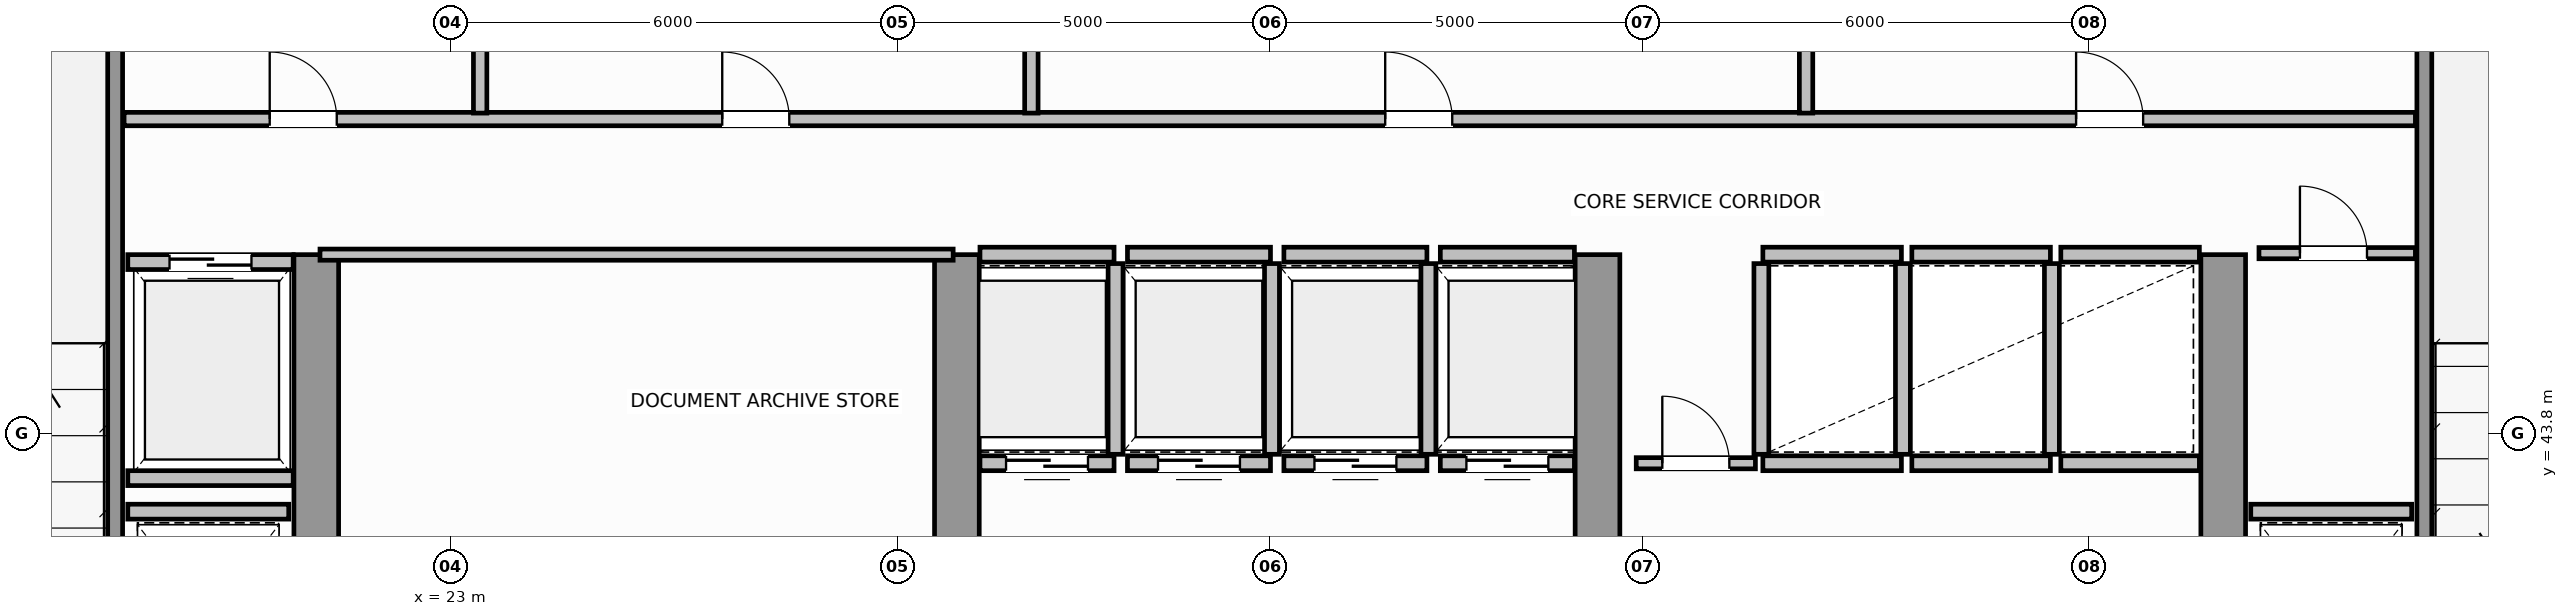
"""IFC4 building model, lengths in metres.
Left out: names, types, materials, properties, quantities, classifications, styles, units other than length and angle.
Written with IfcOpenShell. Run it as: python <this file> out.ifc"""

import sys

from ifc_helpers import new_model, si_unit, direction, frame, frame_2d, origin, place, context, subcontext, project, spatial, rectangle, extrude, source, transform, mapped, element, fill, save


model = new_model("IFC4")
c1 = context("Model", 3, precision=1e-05, world=origin(), true_north=direction((0.0, 1.0)))
c2 = subcontext(c1, "Body", "Model", "MODEL_VIEW")
j1 = project(units=[si_unit("LENGTHUNIT", "METRE"), si_unit("PLANEANGLEUNIT", "RADIAN")], contexts=[c1])
p1 = place(None, origin())
s1 = spatial("IfcSite", under=j1, at=p1, CompositionType="ELEMENT")
p2 = place(p1, origin())
s2 = spatial("IfcBuilding", under=s1, at=p2, CompositionType="ELEMENT")
p3 = place(p2, frame((0.0, 0.0, 191.8)))
s3 = spatial("IfcBuildingStorey", under=s2, at=p3, CompositionType="ELEMENT", Elevation=191.8)
for number, where, z_axis, x_axis in (
    (1, (21.2, 36.82, 0.0), (0.0, 0.0, 1.0), (0.0, 1.0, 0.0)),
    (2, (29.8, 36.82, 0.0), (0.0, 0.0, 1.0), (0.0, 1.0, 0.0)),
    (3, (38.4, 36.82, 0.0), (0.0, 0.0, 1.0), (0.0, 1.0, 0.0)),
    (4, (46.8, 36.82, 0.0), (0.0, 0.0, 1.0), (0.0, 1.0, 0.0)),
):
    element("IfcWall", number, at=place(p3, frame(where, z_axis=z_axis, x_axis=x_axis)), inside=s3, PredefinedType="SHEAR", context=c2, shape_type="SweptSolid", body=[
        extrude(rectangle(XDim=9.38, YDim=0.6, at=frame_2d((4.69, 0.0))), origin(), (0.0, 0.0, 1.0), 3.8),
    ])
for number, where, z_axis, x_axis in (
    (5, (18.5, 39.96, 0.0), (0.0, 0.0, 1.0), (0.0, 1.0, 0.0)),
    (6, (49.5, 39.96, 0.0), (0.0, 0.0, 1.0), (0.0, 1.0, 0.0)),
):
    element("IfcWall", number, at=place(p3, frame(where, z_axis=z_axis, x_axis=x_axis)), inside=s3, PredefinedType="SOLIDWALL", context=c2, shape_type="SweptSolid", body=[
        extrude(rectangle(XDim=9.93, YDim=0.2, at=frame_2d((4.965, 0.0))), origin(), (0.0, 0.0, 1.0), 3.8),
    ])
p4 = place(p3, frame((30.11, 43.4, 0.0), z_axis=(0.0, 0.0, 1.0), x_axis=(1.0, 0.0, 0.0)))
e7 = element("IfcWall", 7, at=p4, inside=s3, PredefinedType="SOLIDWALL", context=c2, shape_type="SweptSolid", body=[
    extrude(rectangle(XDim=1.8, YDim=0.2, at=frame_2d((0.9, 0.0))), origin(), (0.0, 0.0, 1.0), 3.58),
])
p5 = place(p4, frame((0.35, 0.0, 0.0)))
e8 = element("IfcOpeningElement", 8, at=p5, cuts=e7, PredefinedType="OPENING", context=c2, shape_type="SweptSolid", body=[
    extrude(rectangle(XDim=1.1, YDim=2.15, at=frame_2d((0.55, 1.075))), frame((0.0, 0.11, 0.0), z_axis=(0.0, -1.0, 0.0), x_axis=(1.0, 0.0, 0.0)), (0.0, 0.0, 1.0), 0.22),
])
p6 = place(p3, frame((30.11, 46.2, 0.0), z_axis=(0.0, 0.0, 1.0), x_axis=(1.0, 0.0, 0.0)))
e9 = element("IfcWall", 9, at=p6, inside=s3, PredefinedType="SOLIDWALL", context=c2, shape_type="SweptSolid", body=[
    extrude(rectangle(XDim=1.8, YDim=0.2, at=frame_2d((0.9, 0.0))), origin(), (0.0, 0.0, 1.0), 3.58),
])
p7 = place(p3, frame((31.93, 43.52, 0.0), z_axis=(0.0, 0.0, 1.0), x_axis=(0.0, 1.0, 0.0)))
e10 = element("IfcWall", 10, at=p7, inside=s3, PredefinedType="SOLIDWALL", context=c2, shape_type="SweptSolid", body=[
    extrude(rectangle(XDim=2.56, YDim=0.2, at=frame_2d((1.28, 0.0))), origin(), (0.0, 0.0, 1.0), 3.58),
])
p8 = place(p3, frame((32.09, 43.4, 0.0), z_axis=(0.0, 0.0, 1.0), x_axis=(1.0, 0.0, 0.0)))
e11 = element("IfcWall", 11, at=p8, inside=s3, PredefinedType="SOLIDWALL", context=c2, shape_type="SweptSolid", body=[
    extrude(rectangle(XDim=1.92, YDim=0.2, at=frame_2d((0.96, 0.0))), origin(), (0.0, 0.0, 1.0), 3.58),
])
p9 = place(p8, frame((0.41, 0.0, 0.0)))
e12 = element("IfcOpeningElement", 12, at=p9, cuts=e11, PredefinedType="OPENING", context=c2, shape_type="SweptSolid", body=[
    extrude(rectangle(XDim=1.1, YDim=2.15, at=frame_2d((0.55, 1.075))), frame((0.0, 0.11, 0.0), z_axis=(0.0, -1.0, 0.0), x_axis=(1.0, 0.0, 0.0)), (0.0, 0.0, 1.0), 0.22),
])
p10 = place(p3, frame((32.09, 46.2, 0.0), z_axis=(0.0, 0.0, 1.0), x_axis=(1.0, 0.0, 0.0)))
e13 = element("IfcWall", 13, at=p10, inside=s3, PredefinedType="SOLIDWALL", context=c2, shape_type="SweptSolid", body=[
    extrude(rectangle(XDim=1.92, YDim=0.2, at=frame_2d((0.96, 0.0))), origin(), (0.0, 0.0, 1.0), 3.58),
])
p11 = place(p3, frame((34.03, 43.52, 0.0), z_axis=(0.0, 0.0, 1.0), x_axis=(0.0, 1.0, 0.0)))
e14 = element("IfcWall", 14, at=p11, inside=s3, PredefinedType="SOLIDWALL", context=c2, shape_type="SweptSolid", body=[
    extrude(rectangle(XDim=2.56, YDim=0.2, at=frame_2d((1.28, 0.0))), origin(), (0.0, 0.0, 1.0), 3.58),
])
p12 = place(p3, frame((34.19, 43.4, 0.0), z_axis=(0.0, 0.0, 1.0), x_axis=(1.0, 0.0, 0.0)))
e15 = element("IfcWall", 15, at=p12, inside=s3, PredefinedType="SOLIDWALL", context=c2, shape_type="SweptSolid", body=[
    extrude(rectangle(XDim=1.92, YDim=0.2, at=frame_2d((0.96, 0.0))), origin(), (0.0, 0.0, 1.0), 3.58),
])
p13 = place(p12, frame((0.41, 0.0, 0.0)))
e16 = element("IfcOpeningElement", 16, at=p13, cuts=e15, PredefinedType="OPENING", context=c2, shape_type="SweptSolid", body=[
    extrude(rectangle(XDim=1.1, YDim=2.15, at=frame_2d((0.55, 1.075))), frame((0.0, 0.11, 0.0), z_axis=(0.0, -1.0, 0.0), x_axis=(1.0, 0.0, 0.0)), (0.0, 0.0, 1.0), 0.22),
])
p14 = place(p3, frame((34.19, 46.2, 0.0), z_axis=(0.0, 0.0, 1.0), x_axis=(1.0, 0.0, 0.0)))
e17 = element("IfcWall", 17, at=p14, inside=s3, PredefinedType="SOLIDWALL", context=c2, shape_type="SweptSolid", body=[
    extrude(rectangle(XDim=1.92, YDim=0.2, at=frame_2d((0.96, 0.0))), origin(), (0.0, 0.0, 1.0), 3.58),
])
p15 = place(p3, frame((36.13, 43.52, 0.0), z_axis=(0.0, 0.0, 1.0), x_axis=(0.0, 1.0, 0.0)))
e18 = element("IfcWall", 18, at=p15, inside=s3, PredefinedType="SOLIDWALL", context=c2, shape_type="SweptSolid", body=[
    extrude(rectangle(XDim=2.56, YDim=0.2, at=frame_2d((1.28, 0.0))), origin(), (0.0, 0.0, 1.0), 3.58),
])
p16 = place(p3, frame((36.29, 43.4, 0.0), z_axis=(0.0, 0.0, 1.0), x_axis=(1.0, 0.0, 0.0)))
e19 = element("IfcWall", 19, at=p16, inside=s3, PredefinedType="SOLIDWALL", context=c2, shape_type="SweptSolid", body=[
    extrude(rectangle(XDim=1.8, YDim=0.2, at=frame_2d((0.9, 0.0))), origin(), (0.0, 0.0, 1.0), 3.58),
])
p17 = place(p16, frame((0.35, 0.0, 0.0)))
e20 = element("IfcOpeningElement", 20, at=p17, cuts=e19, PredefinedType="OPENING", context=c2, shape_type="SweptSolid", body=[
    extrude(rectangle(XDim=1.1, YDim=2.15, at=frame_2d((0.55, 1.075))), frame((0.0, 0.11, 0.0), z_axis=(0.0, -1.0, 0.0), x_axis=(1.0, 0.0, 0.0)), (0.0, 0.0, 1.0), 0.22),
])
p18 = place(p3, frame((36.29, 46.2, 0.0), z_axis=(0.0, 0.0, 1.0), x_axis=(1.0, 0.0, 0.0)))
e21 = element("IfcWall", 21, at=p18, inside=s3, PredefinedType="SOLIDWALL", context=c2, shape_type="SweptSolid", body=[
    extrude(rectangle(XDim=1.8, YDim=0.2, at=frame_2d((0.9, 0.0))), origin(), (0.0, 0.0, 1.0), 3.58),
])
for number, where, z_axis, x_axis in (
    (22, (40.62, 43.4, 0.0), (0.0, 0.0, 1.0), (1.0, 0.0, 0.0)),
    (23, (40.62, 46.2, 0.0), (0.0, 0.0, 1.0), (1.0, 0.0, 0.0)),
):
    element("IfcWall", number, at=place(p3, frame(where, z_axis=z_axis, x_axis=x_axis)), inside=s3, PredefinedType="SOLIDWALL", context=c2, shape_type="SweptSolid", body=[
        extrude(rectangle(XDim=1.86, YDim=0.2, at=frame_2d((0.93, 0.0))), origin(), (0.0, 0.0, 1.0), 3.58),
    ])
for number, where, z_axis, x_axis in (
    (24, (40.6, 43.52, 0.0), (0.0, 0.0, 1.0), (0.0, 1.0, 0.0)),
    (25, (42.5, 43.52, 0.0), (0.0, 0.0, 1.0), (0.0, 1.0, 0.0)),
):
    element("IfcWall", number, at=place(p3, frame(where, z_axis=z_axis, x_axis=x_axis)), inside=s3, PredefinedType="SOLIDWALL", context=c2, shape_type="SweptSolid", body=[
        extrude(rectangle(XDim=2.56, YDim=0.2, at=frame_2d((1.28, 0.0))), origin(), (0.0, 0.0, 1.0), 3.58),
    ])
for number, where, z_axis, x_axis in (
    (26, (42.62, 43.4, 0.0), (0.0, 0.0, 1.0), (1.0, 0.0, 0.0)),
    (27, (42.62, 46.2, 0.0), (0.0, 0.0, 1.0), (1.0, 0.0, 0.0)),
):
    element("IfcWall", number, at=place(p3, frame(where, z_axis=z_axis, x_axis=x_axis)), inside=s3, PredefinedType="SOLIDWALL", context=c2, shape_type="SweptSolid", body=[
        extrude(rectangle(XDim=1.86, YDim=0.2, at=frame_2d((0.93, 0.0))), origin(), (0.0, 0.0, 1.0), 3.58),
    ])
p19 = place(p3, frame((44.5, 43.52, 0.0), z_axis=(0.0, 0.0, 1.0), x_axis=(0.0, 1.0, 0.0)))
e28 = element("IfcWall", 28, at=p19, inside=s3, PredefinedType="SOLIDWALL", context=c2, shape_type="SweptSolid", body=[
    extrude(rectangle(XDim=2.56, YDim=0.2, at=frame_2d((1.28, 0.0))), origin(), (0.0, 0.0, 1.0), 3.58),
])
for number, where, z_axis, x_axis in (
    (29, (44.62, 43.4, 0.0), (0.0, 0.0, 1.0), (1.0, 0.0, 0.0)),
    (30, (44.62, 46.2, 0.0), (0.0, 0.0, 1.0), (1.0, 0.0, 0.0)),
):
    element("IfcWall", number, at=place(p3, frame(where, z_axis=z_axis, x_axis=x_axis)), inside=s3, PredefinedType="SOLIDWALL", context=c2, shape_type="SweptSolid", body=[
        extrude(rectangle(XDim=1.86, YDim=0.2, at=frame_2d((0.93, 0.0))), origin(), (0.0, 0.0, 1.0), 3.58),
    ])
p20 = place(p3, frame((18.67, 46.1, 0.0), z_axis=(0.0, 0.0, 1.0), x_axis=(1.0, 0.0, 0.0)))
e31 = element("IfcWall", 31, at=p20, inside=s3, PredefinedType="SOLIDWALL", context=c2, shape_type="SweptSolid", body=[
    extrude(rectangle(XDim=2.22, YDim=0.2, at=frame_2d((1.11, 0.0))), origin(), (0.0, 0.0, 1.0), 3.58),
])
p21 = place(p20, frame((0.56, 0.0, 0.0)))
e32 = element("IfcOpeningElement", 32, at=p21, cuts=e31, PredefinedType="OPENING", context=c2, shape_type="SweptSolid", body=[
    extrude(rectangle(XDim=1.1, YDim=2.15, at=frame_2d((0.55, 1.075))), frame((0.0, 0.11, 0.0), z_axis=(0.0, -1.0, 0.0), x_axis=(1.0, 0.0, 0.0)), (0.0, 0.0, 1.0), 0.22),
])
p22 = place(p3, frame((18.67, 43.2, 0.0), z_axis=(0.0, 0.0, 1.0), x_axis=(1.0, 0.0, 0.0)))
e33 = element("IfcWall", 33, at=p22, inside=s3, PredefinedType="SOLIDWALL", context=c2, shape_type="SweptSolid", body=[
    extrude(rectangle(XDim=2.22, YDim=0.2, at=frame_2d((1.11, 0.0))), origin(), (0.0, 0.0, 1.0), 3.58),
])
for number, where, z_axis, x_axis in (
    (34, (18.67, 42.75, 0.0), (0.0, 0.0, 1.0), (1.0, 0.0, 0.0)),
    (35, (47.17, 42.75, 0.0), (0.0, 0.0, 1.0), (1.0, 0.0, 0.0)),
):
    element("IfcWall", number, at=place(p3, frame(where, z_axis=z_axis, x_axis=x_axis)), inside=s3, PredefinedType="SOLIDWALL", context=c2, shape_type="SweptSolid", body=[
        extrude(rectangle(XDim=2.16, YDim=0.2, at=frame_2d((1.08, 0.0))), origin(), (0.0, 0.0, 1.0), 3.58),
    ])
p23 = place(p3, frame((21.25, 46.2, 0.0), z_axis=(0.0, 0.0, 1.0), x_axis=(1.0, 0.0, 0.0)))
e36 = element("IfcWall", 36, at=p23, inside=s3, PredefinedType="PARTITIONING", context=c2, shape_type="SweptSolid", body=[
    extrude(rectangle(XDim=8.5, YDim=0.15, at=frame_2d((4.25, 0.0))), origin(), (0.0, 0.0, 1.0), 3.58),
])
p24 = place(p3, frame((47.28, 46.22, 0.0), z_axis=(0.0, 0.0, 1.0), x_axis=(1.0, 0.0, 0.0)))
e37 = element("IfcWall", 37, at=p24, inside=s3, PredefinedType="PARTITIONING", context=c2, shape_type="SweptSolid", body=[
    extrude(rectangle(XDim=2.1, YDim=0.15, at=frame_2d((1.05, 0.0))), origin(), (0.0, 0.0, 1.0), 3.58),
])
p25 = place(p24, frame((0.55, 0.0, 0.0)))
e38 = element("IfcOpeningElement", 38, at=p25, cuts=e37, PredefinedType="OPENING", context=c2, shape_type="SweptSolid", body=[
    extrude(rectangle(XDim=0.9, YDim=2.1, at=frame_2d((0.45, 1.05))), frame((0.0, 0.085, 0.0), z_axis=(0.0, -1.0, 0.0), x_axis=(1.0, 0.0, 0.0)), (0.0, 0.0, 1.0), 0.17),
])
p26 = place(p3, frame((38.92, 43.4, 0.0), z_axis=(0.0, 0.0, 1.0), x_axis=(1.0, 0.0, 0.0)))
e39 = element("IfcWall", 39, at=p26, inside=s3, PredefinedType="PARTITIONING", context=c2, shape_type="SweptSolid", body=[
    extrude(rectangle(XDim=1.6, YDim=0.15, at=frame_2d((0.8, 0.0))), origin(), (0.0, 0.0, 1.0), 3.58),
])
p27 = place(p26, frame((0.35, 0.0, 0.0)))
e40 = element("IfcOpeningElement", 40, at=p27, cuts=e39, PredefinedType="OPENING", context=c2, shape_type="SweptSolid", body=[
    extrude(rectangle(XDim=0.9, YDim=2.1, at=frame_2d((0.45, 1.05))), frame((0.0, 0.085, 0.0), z_axis=(0.0, -1.0, 0.0), x_axis=(1.0, 0.0, 0.0)), (0.0, 0.0, 1.0), 0.17),
])
p28 = place(p3, frame((18.62, 48.02, 0.0), z_axis=(0.0, 0.0, 1.0), x_axis=(1.0, 0.0, 0.0)))
e41 = element("IfcWall", 41, at=p28, inside=s3, PredefinedType="PLUMBINGWALL", context=c2, shape_type="SweptSolid", body=[
    extrude(rectangle(XDim=30.76, YDim=0.18, at=frame_2d((15.38, 0.0))), origin(), (0.0, 0.0, 1.0), 3.58),
])
p29 = place(p28, frame((1.955, 0.0, 0.0)))
e42 = element("IfcOpeningElement", 42, at=p29, cuts=e41, PredefinedType="OPENING", context=c2, shape_type="SweptSolid", body=[
    extrude(rectangle(XDim=0.9, YDim=2.15, at=frame_2d((0.45, 1.075))), frame((0.0, 0.1, 0.0), z_axis=(0.0, -1.0, 0.0), x_axis=(1.0, 0.0, 0.0)), (0.0, 0.0, 1.0), 0.2),
])
p30 = place(p28, frame((8.03, 0.0, 0.0)))
e43 = element("IfcOpeningElement", 43, at=p30, cuts=e41, PredefinedType="OPENING", context=c2, shape_type="SweptSolid", body=[
    extrude(rectangle(XDim=0.9, YDim=2.15, at=frame_2d((0.45, 1.075))), frame((0.0, 0.1, 0.0), z_axis=(0.0, -1.0, 0.0), x_axis=(1.0, 0.0, 0.0)), (0.0, 0.0, 1.0), 0.2),
])
p31 = place(p28, frame((16.93, 0.0, 0.0)))
e44 = element("IfcOpeningElement", 44, at=p31, cuts=e41, PredefinedType="OPENING", context=c2, shape_type="SweptSolid", body=[
    extrude(rectangle(XDim=0.9, YDim=2.15, at=frame_2d((0.45, 1.075))), frame((0.0, 0.1, 0.0), z_axis=(0.0, -1.0, 0.0), x_axis=(1.0, 0.0, 0.0)), (0.0, 0.0, 1.0), 0.2),
])
p32 = place(p28, frame((26.205, 0.0, 0.0)))
e45 = element("IfcOpeningElement", 45, at=p32, cuts=e41, PredefinedType="OPENING", context=c2, shape_type="SweptSolid", body=[
    extrude(rectangle(XDim=0.9, YDim=2.15, at=frame_2d((0.45, 1.075))), frame((0.0, 0.1, 0.0), z_axis=(0.0, -1.0, 0.0), x_axis=(1.0, 0.0, 0.0)), (0.0, 0.0, 1.0), 0.2),
])
for number, where, z_axis, x_axis in (
    (46, (23.4, 48.1, 0.0), (0.0, 0.0, 1.0), (0.0, 1.0, 0.0)),
    (47, (30.8, 48.1, 0.0), (0.0, 0.0, 1.0), (0.0, 1.0, 0.0)),
    (48, (41.2, 48.1, 0.0), (0.0, 0.0, 1.0), (0.0, 1.0, 0.0)),
):
    element("IfcWall", number, at=place(p3, frame(where, z_axis=z_axis, x_axis=x_axis)), inside=s3, PredefinedType="PLUMBINGWALL", context=c2, shape_type="SweptSolid", body=[
        extrude(rectangle(XDim=2.28, YDim=0.18, at=frame_2d((1.14, 0.0))), origin(), (0.0, 0.0, 1.0), 3.58),
    ])
m1 = source(origin(), c2, "Body", "SweptSolid", [
    extrude(rectangle(XDim=1.1, YDim=2.15, at=frame_2d((0.55, 1.075))), frame((0.0, 0.025, 0.0), z_axis=(0.0, -1.0, 0.0), x_axis=(1.0, 0.0, 0.0)), (0.0, 0.0, 1.0), 0.05),
])
p33 = place(p5, origin())
e49 = element("IfcDoor", 49, at=p33, inside=s3, OperationType="DOUBLE_DOOR_SLIDING", PredefinedType="DOOR", context=c2, shape_type="MappedRepresentation", body=[
    mapped(m1, transform((0.0, 0.0, 0.0), scale=1.0)),
])
fill(e8, e49)
p34 = place(p9, origin())
e50 = element("IfcDoor", 50, at=p34, inside=s3, OperationType="DOUBLE_DOOR_SLIDING", PredefinedType="DOOR", context=c2, shape_type="MappedRepresentation", body=[
    mapped(m1, transform((0.0, 0.0, 0.0), scale=1.0)),
])
fill(e12, e50)
p35 = place(p13, origin())
e51 = element("IfcDoor", 51, at=p35, inside=s3, OperationType="DOUBLE_DOOR_SLIDING", PredefinedType="DOOR", context=c2, shape_type="MappedRepresentation", body=[
    mapped(m1, transform((0.0, 0.0, 0.0), scale=1.0)),
])
fill(e16, e51)
p36 = place(p17, origin())
e52 = element("IfcDoor", 52, at=p36, inside=s3, OperationType="DOUBLE_DOOR_SLIDING", PredefinedType="DOOR", context=c2, shape_type="MappedRepresentation", body=[
    mapped(m1, transform((0.0, 0.0, 0.0), scale=1.0)),
])
fill(e20, e52)
p37 = place(p21, origin())
e53 = element("IfcDoor", 53, at=p37, inside=s3, OperationType="DOUBLE_DOOR_SLIDING", PredefinedType="DOOR", context=c2, shape_type="MappedRepresentation", body=[
    mapped(m1, transform((0.0, 0.0, 0.0), scale=1.0)),
])
fill(e32, e53)
m2 = source(origin(), c2, "Body", "SweptSolid", [
    extrude(rectangle(XDim=0.9, YDim=2.1, at=frame_2d((0.45, 1.05))), frame((0.0, 0.025, 0.0), z_axis=(0.0, -1.0, 0.0), x_axis=(1.0, 0.0, 0.0)), (0.0, 0.0, 1.0), 0.05),
])
p38 = place(p25, origin())
e54 = element("IfcDoor", 54, at=p38, inside=s3, OperationType="SINGLE_SWING_RIGHT", PredefinedType="DOOR", context=c2, shape_type="MappedRepresentation", body=[
    mapped(m2, transform((0.0, 0.0, 0.0), scale=1.0)),
])
fill(e38, e54)
p39 = place(p27, origin())
e55 = element("IfcDoor", 55, at=p39, inside=s3, OperationType="SINGLE_SWING_LEFT", PredefinedType="DOOR", context=c2, shape_type="MappedRepresentation", body=[
    mapped(m2, transform((0.0, 0.0, 0.0), scale=1.0)),
])
fill(e40, e55)
m3 = source(origin(), c2, "Body", "SweptSolid", [
    extrude(rectangle(XDim=0.9, YDim=2.15, at=frame_2d((0.45, 1.075))), frame((0.0, 0.025, 0.0), z_axis=(0.0, -1.0, 0.0), x_axis=(1.0, 0.0, 0.0)), (0.0, 0.0, 1.0), 0.05),
])
p40 = place(p29, origin())
e56 = element("IfcDoor", 56, at=p40, inside=s3, OperationType="SINGLE_SWING_LEFT", PredefinedType="DOOR", context=c2, shape_type="MappedRepresentation", body=[
    mapped(m3, transform((0.0, 0.0, 0.0), scale=1.0)),
])
fill(e42, e56)
p41 = place(p30, origin())
e57 = element("IfcDoor", 57, at=p41, inside=s3, OperationType="SINGLE_SWING_RIGHT", PredefinedType="DOOR", context=c2, shape_type="MappedRepresentation", body=[
    mapped(m3, transform((0.0, 0.0, 0.0), scale=1.0)),
])
fill(e43, e57)
p42 = place(p31, origin())
e58 = element("IfcDoor", 58, at=p42, inside=s3, OperationType="SINGLE_SWING_LEFT", PredefinedType="DOOR", context=c2, shape_type="MappedRepresentation", body=[
    mapped(m3, transform((0.0, 0.0, 0.0), scale=1.0)),
])
fill(e44, e58)
p43 = place(p32, origin())
e59 = element("IfcDoor", 59, at=p43, inside=s3, OperationType="SINGLE_SWING_RIGHT", PredefinedType="DOOR", context=c2, shape_type="MappedRepresentation", body=[
    mapped(m3, transform((0.0, 0.0, 0.0), scale=1.0)),
])
fill(e45, e59)
save(model, sys.argv[1])
